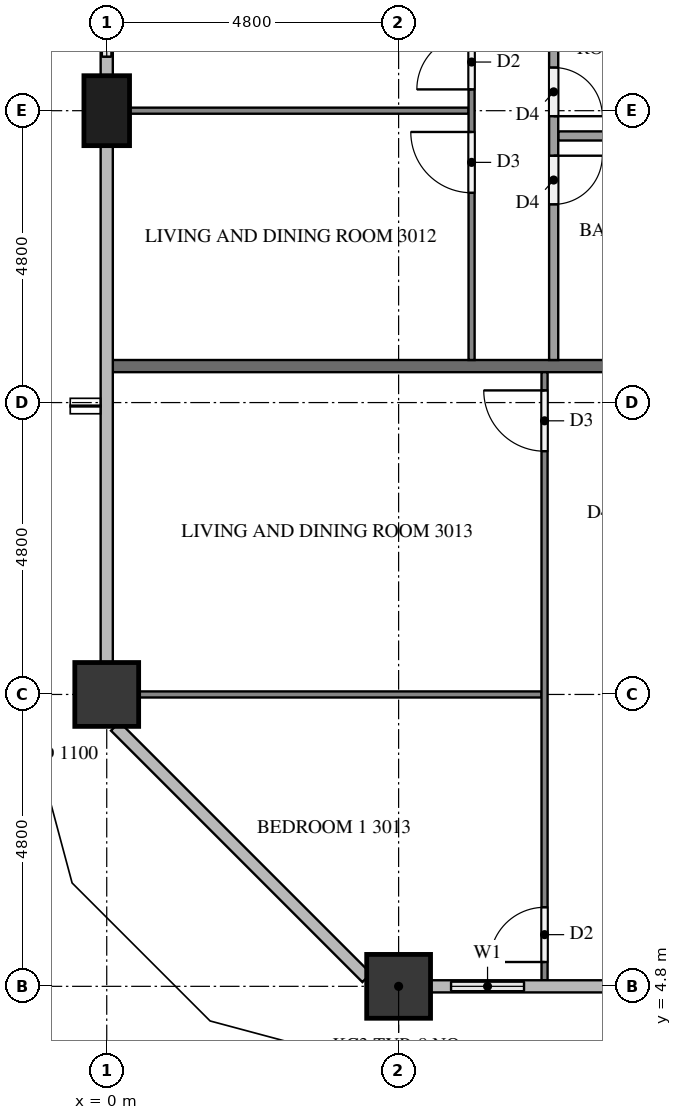
"""IFC4 building model, lengths in metres.
Left out: names, types, materials, properties, quantities, classifications, styles, units other than length and angle.
Written with IfcOpenShell. Run it as: python <this file> out.ifc"""

import sys

from ifc_helpers import new_model, si_unit, direction, frame, frame_2d, origin, origin_2d, place, context, subcontext, project, spatial, rectangle, extrude, element, fill, save


model = new_model("IFC4")
c1 = context("Model", 3, precision=1e-05, world=origin(), true_north=direction((0.0, 1.0)))
c2 = subcontext(c1, "Body", "Model", "MODEL_VIEW")
j1 = project(units=[si_unit("LENGTHUNIT", "METRE"), si_unit("PLANEANGLEUNIT", "RADIAN")], contexts=[c1])
p1 = place(None, origin())
s1 = spatial("IfcSite", under=j1, at=p1, CompositionType="ELEMENT")
p2 = place(p1, origin())
s2 = spatial("IfcBuilding", under=s1, at=p2, CompositionType="ELEMENT")
p3 = place(p2, frame((0.0, 0.0, 119.1)))
s3 = spatial("IfcBuildingStorey", under=s2, at=p3, CompositionType="ELEMENT", Elevation=119.1)
p4 = place(p3, frame((4.8, 4.8, 0.0), z_axis=(0.0, 0.0, 1.0), x_axis=(1.0, 0.0, 0.0)))
e1 = element("IfcColumn", 1, at=p4, inside=s3, PredefinedType="COLUMN", context=c2, shape_type="SweptSolid", body=[
    extrude(rectangle(XDim=1.05, YDim=1.05, at=origin_2d()), origin(), (0.0, 0.0, 1.0), 3.2),
])
p5 = place(p3, frame((0.0, 19.2, 0.0), z_axis=(0.0, 0.0, 1.0), x_axis=(0.0, 1.0, 0.0)))
e2 = element("IfcColumn", 2, at=p5, inside=s3, PredefinedType="COLUMN", context=c2, shape_type="SweptSolid", body=[
    extrude(rectangle(XDim=1.15, YDim=0.75, at=origin_2d()), origin(), (0.0, 0.0, 1.0), 3.2),
])
p6 = place(p3, frame((0.0, 9.6, 0.0), z_axis=(0.0, 0.0, 1.0), x_axis=(1.0, 0.0, 0.0)))
e3 = element("IfcColumn", 3, at=p6, inside=s3, PredefinedType="COLUMN", context=c2, shape_type="SweptSolid", body=[
    extrude(rectangle(XDim=1.05, YDim=1.05, at=origin_2d()), origin(), (0.0, 0.0, 1.0), 3.2),
])
p7 = place(p3, frame((5.325, 4.8, 0.0), z_axis=(0.0, 0.0, 1.0), x_axis=(1.0, 0.0, 0.0)))
e4 = element("IfcWall", 4, at=p7, inside=s3, PredefinedType="SOLIDWALL", context=c2, shape_type="SweptSolid", body=[
    extrude(rectangle(XDim=1.875, YDim=0.15, at=frame_2d((0.938, 0.0))), origin(), (0.0, 0.0, 1.0), 3.2),
])
p8 = place(p7, frame((0.337, 0.0, 0.9)))
e5 = element("IfcOpeningElement", 5, at=p8, cuts=e4, PredefinedType="OPENING", context=c2, shape_type="SweptSolid", body=[
    extrude(rectangle(XDim=1.2, YDim=1.4, at=frame_2d((0.6, 0.7))), frame((0.0, 0.085, 0.0), z_axis=(0.0, -1.0, 0.0), x_axis=(1.0, 0.0, 0.0)), (0.0, 0.0, 1.0), 0.17),
])
p9 = place(p3, frame((0.0, 21.6, 0.0), z_axis=(0.0, 0.0, 1.0), x_axis=(0.0, -1.0, 0.0)))
e6 = element("IfcWall", 6, at=p9, inside=s3, PredefinedType="SOLIDWALL", context=c2, shape_type="SweptSolid", body=[
    extrude(rectangle(XDim=1.825, YDim=0.15, at=frame_2d((0.913, 0.0))), origin(), (0.0, 0.0, 1.0), 3.2),
])
p10 = place(p9, frame((0.312, 0.0, 0.9)))
e7 = element("IfcOpeningElement", 7, at=p10, cuts=e6, PredefinedType="OPENING", context=c2, shape_type="SweptSolid", body=[
    extrude(rectangle(XDim=1.2, YDim=1.4, at=frame_2d((0.6, 0.7))), frame((0.0, 0.085, 0.0), z_axis=(0.0, -1.0, 0.0), x_axis=(1.0, 0.0, 0.0)), (0.0, 0.0, 1.0), 0.17),
])
p11 = place(p3, frame((0.1, 15.0, 0.0), z_axis=(0.0, 0.0, 1.0), x_axis=(1.0, 0.0, 0.0)))
e8 = element("IfcWall", 8, at=p11, inside=s3, PredefinedType="PARTITIONING", context=c2, shape_type="SweptSolid", body=[
    extrude(rectangle(XDim=9.8, YDim=0.2, at=frame_2d((4.9, 0.0))), origin(), (0.0, 0.0, 1.0), 3.2),
])
p12 = place(p3, frame((5.95, 19.2, 0.0), z_axis=(0.0, 0.0, 1.0), x_axis=(-1.0, 0.0, 0.0)))
e9 = element("IfcWall", 9, at=p12, inside=s3, PredefinedType="PARTITIONING", context=c2, shape_type="SweptSolid", body=[
    extrude(rectangle(XDim=5.575, YDim=0.1, at=frame_2d((2.788, 0.0))), origin(), (0.0, 0.0, 1.0), 3.2),
])
p13 = place(p3, frame((6.0, 15.1, 0.0), z_axis=(0.0, 0.0, 1.0), x_axis=(0.0, 1.0, 0.0)))
e10 = element("IfcWall", 10, at=p13, inside=s3, PredefinedType="PARTITIONING", context=c2, shape_type="SweptSolid", body=[
    extrude(rectangle(XDim=13.6, YDim=0.1, at=frame_2d((6.8, 0.0))), origin(), (0.0, 0.0, 1.0), 3.2),
])
p14 = place(p13, frame((12.4, 0.0, 0.0)))
e11 = element("IfcOpeningElement", 11, at=p14, cuts=e10, PredefinedType="OPENING", context=c2, shape_type="SweptSolid", body=[
    extrude(rectangle(XDim=0.9, YDim=2.1, at=frame_2d((0.45, 1.05))), frame((0.0, 0.06, 0.0), z_axis=(0.0, -1.0, 0.0), x_axis=(1.0, 0.0, 0.0)), (0.0, 0.0, 1.0), 0.12),
])
p15 = place(p13, frame((4.45, 0.0, 0.0)))
e12 = element("IfcOpeningElement", 12, at=p15, cuts=e10, PredefinedType="OPENING", context=c2, shape_type="SweptSolid", body=[
    extrude(rectangle(XDim=0.9, YDim=2.1, at=frame_2d((0.45, 1.05))), frame((0.0, 0.06, 0.0), z_axis=(0.0, -1.0, 0.0), x_axis=(1.0, 0.0, 0.0)), (0.0, 0.0, 1.0), 0.12),
])
p16 = place(p13, frame((2.75, 0.0, 0.0)))
e13 = element("IfcOpeningElement", 13, at=p16, cuts=e10, PredefinedType="OPENING", context=c2, shape_type="SweptSolid", body=[
    extrude(rectangle(XDim=1.0, YDim=2.1, at=frame_2d((0.5, 1.05))), frame((0.0, 0.06, 0.0), z_axis=(0.0, -1.0, 0.0), x_axis=(1.0, 0.0, 0.0)), (0.0, 0.0, 1.0), 0.12),
])
p17 = place(p3, frame((9.9, 18.785, 0.0), z_axis=(0.0, 0.0, 1.0), x_axis=(-1.0, 0.0, 0.0)))
e14 = element("IfcWall", 14, at=p17, inside=s3, PredefinedType="PARTITIONING", context=c2, shape_type="SweptSolid", body=[
    extrude(rectangle(XDim=2.475, YDim=0.15, at=frame_2d((1.237, 0.0))), origin(), (0.0, 0.0, 1.0), 3.2),
])
p18 = place(p3, frame((7.35, 27.075, 0.0), z_axis=(0.0, 0.0, 1.0), x_axis=(0.0, -1.0, 0.0)))
e15 = element("IfcWall", 15, at=p18, inside=s3, PredefinedType="PARTITIONING", context=c2, shape_type="SweptSolid", body=[
    extrude(rectangle(XDim=11.975, YDim=0.15, at=frame_2d((5.987, 0.0))), origin(), (0.0, 0.0, 1.0), 3.2),
])
p19 = place(p18, frame((0.3, 0.0, 0.0)))
e16 = element("IfcOpeningElement", 16, at=p19, cuts=e15, PredefinedType="OPENING", context=c2, shape_type="SweptSolid", body=[
    extrude(rectangle(XDim=0.9, YDim=2.1, at=frame_2d((0.45, 1.05))), frame((0.0, 0.085, 0.0), z_axis=(0.0, -1.0, 0.0), x_axis=(1.0, 0.0, 0.0)), (0.0, 0.0, 1.0), 0.17),
])
p20 = place(p18, frame((7.165, 0.0, 0.0)))
e17 = element("IfcOpeningElement", 17, at=p20, cuts=e15, PredefinedType="OPENING", context=c2, shape_type="SweptSolid", body=[
    extrude(rectangle(XDim=0.8, YDim=2.1, at=frame_2d((0.4, 1.05))), frame((0.0, 0.085, 0.0), z_axis=(0.0, -1.0, 0.0), x_axis=(1.0, 0.0, 0.0)), (0.0, 0.0, 1.0), 0.17),
])
p21 = place(p18, frame((8.615, 0.0, 0.0)))
e18 = element("IfcOpeningElement", 18, at=p21, cuts=e15, PredefinedType="OPENING", context=c2, shape_type="SweptSolid", body=[
    extrude(rectangle(XDim=0.8, YDim=2.1, at=frame_2d((0.4, 1.05))), frame((0.0, 0.085, 0.0), z_axis=(0.0, -1.0, 0.0), x_axis=(1.0, 0.0, 0.0)), (0.0, 0.0, 1.0), 0.17),
])
p22 = place(p3, frame((7.15, 9.6, 0.0), z_axis=(0.0, 0.0, 1.0), x_axis=(-1.0, 0.0, 0.0)))
e19 = element("IfcWall", 19, at=p22, inside=s3, PredefinedType="PARTITIONING", context=c2, shape_type="SweptSolid", body=[
    extrude(rectangle(XDim=6.625, YDim=0.1, at=frame_2d((3.312, 0.0))), origin(), (0.0, 0.0, 1.0), 3.2),
])
p23 = place(p3, frame((7.2, 4.9, 0.0), z_axis=(0.0, 0.0, 1.0), x_axis=(0.0, 1.0, 0.0)))
e20 = element("IfcWall", 20, at=p23, inside=s3, PredefinedType="PARTITIONING", context=c2, shape_type="SweptSolid", body=[
    extrude(rectangle(XDim=10.0, YDim=0.1, at=frame_2d((5.0, 0.0))), origin(), (0.0, 0.0, 1.0), 3.2),
])
p24 = place(p23, frame((8.7, 0.0, 0.0)))
e21 = element("IfcOpeningElement", 21, at=p24, cuts=e20, PredefinedType="OPENING", context=c2, shape_type="SweptSolid", body=[
    extrude(rectangle(XDim=1.0, YDim=2.1, at=frame_2d((0.5, 1.05))), frame((0.0, 0.06, 0.0), z_axis=(0.0, -1.0, 0.0), x_axis=(1.0, 0.0, 0.0)), (0.0, 0.0, 1.0), 0.12),
])
p25 = place(p23, frame((0.3, 0.0, 0.0)))
e22 = element("IfcOpeningElement", 22, at=p25, cuts=e20, PredefinedType="OPENING", context=c2, shape_type="SweptSolid", body=[
    extrude(rectangle(XDim=0.9, YDim=2.1, at=frame_2d((0.45, 1.05))), frame((0.0, 0.06, 0.0), z_axis=(0.0, -1.0, 0.0), x_axis=(1.0, 0.0, 0.0)), (0.0, 0.0, 1.0), 0.12),
])
p26 = place(p8, origin())
e23 = element("IfcWindow", 23, at=p26, inside=s3, PartitioningType="SINGLE_PANEL", PredefinedType="WINDOW", context=c2, shape_type="SweptSolid", body=[
    extrude(rectangle(XDim=1.2, YDim=1.4, at=frame_2d((0.6, 0.7))), frame((0.0, 0.03, 0.0), z_axis=(0.0, -1.0, 0.0), x_axis=(1.0, 0.0, 0.0)), (0.0, 0.0, 1.0), 0.06),
])
fill(e5, e23)
p27 = place(p10, origin())
e24 = element("IfcWindow", 24, at=p27, inside=s3, PartitioningType="SINGLE_PANEL", PredefinedType="WINDOW", context=c2, shape_type="SweptSolid", body=[
    extrude(rectangle(XDim=1.2, YDim=1.4, at=frame_2d((0.6, 0.7))), frame((0.0, 0.03, 0.0), z_axis=(0.0, -1.0, 0.0), x_axis=(1.0, 0.0, 0.0)), (0.0, 0.0, 1.0), 0.06),
])
fill(e7, e24)
p28 = place(p15, origin())
e25 = element("IfcDoor", 25, at=p28, inside=s3, OperationType="SINGLE_SWING_LEFT", PredefinedType="DOOR", context=c2, shape_type="SweptSolid", body=[
    extrude(rectangle(XDim=0.9, YDim=2.1, at=frame_2d((0.45, 1.05))), frame((0.0, 0.025, 0.0), z_axis=(0.0, -1.0, 0.0), x_axis=(1.0, 0.0, 0.0)), (0.0, 0.0, 1.0), 0.05),
])
fill(e12, e25)
p29 = place(p16, origin())
e26 = element("IfcDoor", 26, at=p29, inside=s3, OperationType="SINGLE_SWING_RIGHT", PredefinedType="DOOR", context=c2, shape_type="SweptSolid", body=[
    extrude(rectangle(XDim=1.0, YDim=2.1, at=frame_2d((0.5, 1.05))), frame((0.0, 0.025, 0.0), z_axis=(0.0, -1.0, 0.0), x_axis=(1.0, 0.0, 0.0)), (0.0, 0.0, 1.0), 0.05),
])
fill(e13, e26)
p30 = place(p20, origin())
e27 = element("IfcDoor", 27, at=p30, inside=s3, OperationType="SINGLE_SWING_RIGHT", PredefinedType="DOOR", context=c2, shape_type="SweptSolid", body=[
    extrude(rectangle(XDim=0.8, YDim=2.1, at=frame_2d((0.4, 1.05))), frame((0.0, 0.025, 0.0), z_axis=(0.0, -1.0, 0.0), x_axis=(1.0, 0.0, 0.0)), (0.0, 0.0, 1.0), 0.05),
])
fill(e17, e27)
p31 = place(p21, origin())
e28 = element("IfcDoor", 28, at=p31, inside=s3, OperationType="SINGLE_SWING_LEFT", PredefinedType="DOOR", context=c2, shape_type="SweptSolid", body=[
    extrude(rectangle(XDim=0.8, YDim=2.1, at=frame_2d((0.4, 1.05))), frame((0.0, 0.025, 0.0), z_axis=(0.0, -1.0, 0.0), x_axis=(1.0, 0.0, 0.0)), (0.0, 0.0, 1.0), 0.05),
])
fill(e18, e28)
p32 = place(p24, origin())
e29 = element("IfcDoor", 29, at=p32, inside=s3, OperationType="SINGLE_SWING_RIGHT", PredefinedType="DOOR", context=c2, shape_type="SweptSolid", body=[
    extrude(rectangle(XDim=1.0, YDim=2.1, at=frame_2d((0.5, 1.05))), frame((0.0, 0.025, 0.0), z_axis=(0.0, -1.0, 0.0), x_axis=(1.0, 0.0, 0.0)), (0.0, 0.0, 1.0), 0.05),
])
fill(e21, e29)
p33 = place(p25, origin())
e30 = element("IfcDoor", 30, at=p33, inside=s3, OperationType="SINGLE_SWING_LEFT", PredefinedType="DOOR", context=c2, shape_type="SweptSolid", body=[
    extrude(rectangle(XDim=0.9, YDim=2.1, at=frame_2d((0.45, 1.05))), frame((0.0, 0.025, 0.0), z_axis=(0.0, -1.0, 0.0), x_axis=(1.0, 0.0, 0.0)), (0.0, 0.0, 1.0), 0.05),
])
fill(e22, e30)
save(model, sys.argv[1])
